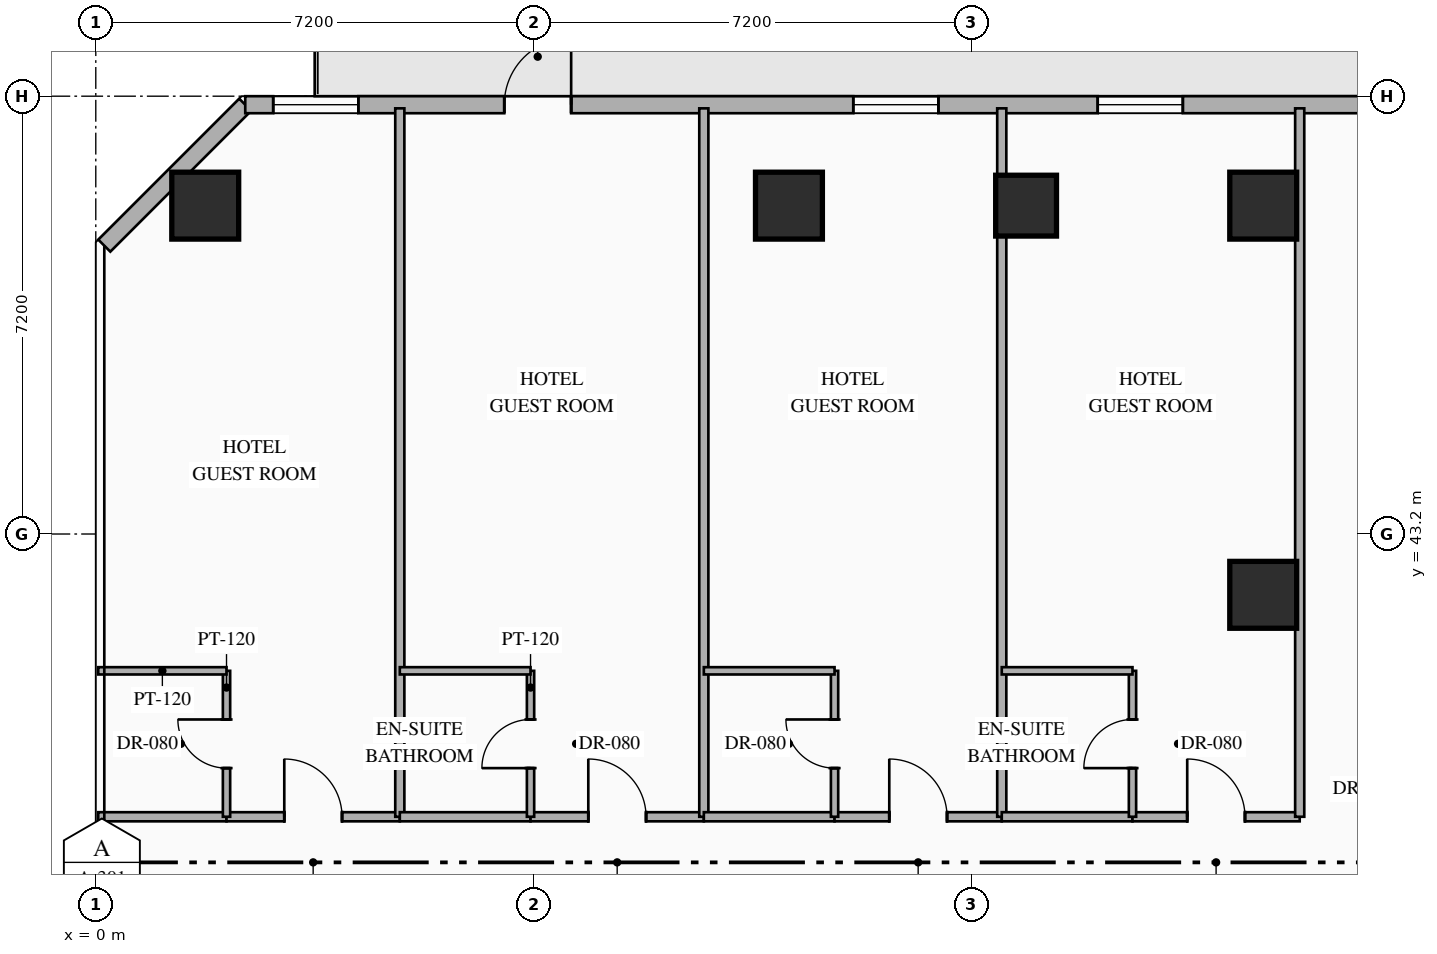
"""IFC4 building model, lengths in metres.
Left out: names, types, materials, properties, quantities, classifications, styles, units other than length and angle.
Written with IfcOpenShell. Run it as: python <this file> out.ifc"""

import sys

from ifc_helpers import new_model, si_unit, direction, frame, frame_2d, origin, origin_2d, place, context, subcontext, project, spatial, rectangle, hollow_rectangle, extrude, element, fill, save


model = new_model("IFC4")
c1 = context("Model", 3, precision=1e-05, world=origin(), true_north=direction((0.0, 1.0)))
c2 = subcontext(c1, "Body", "Model", "MODEL_VIEW")
j1 = project(units=[si_unit("LENGTHUNIT", "METRE"), si_unit("PLANEANGLEUNIT", "RADIAN")], contexts=[c1])
p1 = place(None, origin())
s1 = spatial("IfcSite", under=j1, at=p1, CompositionType="ELEMENT")
p2 = place(p1, origin())
s2 = spatial("IfcBuilding", under=s1, at=p2, CompositionType="ELEMENT")
p3 = place(p2, frame((0.0, 0.0, 43.3)))
s3 = spatial("IfcBuildingStorey", under=s2, at=p3, CompositionType="ELEMENT", Elevation=43.3)
for number, where, z_axis, x_axis in (
    (1, (1.8, 48.6, 0.0), (0.0, 0.0, 1.0), (1.0, 0.0, 0.0)),
    (2, (11.4, 48.6, 0.0), (0.0, 0.0, 1.0), (1.0, 0.0, 0.0)),
    (3, (19.2, 48.6, 0.0), (0.0, 0.0, 1.0), (1.0, 0.0, 0.0)),
    (4, (19.2, 42.2, 0.0), (0.0, 0.0, 1.0), (1.0, 0.0, 0.0)),
):
    element("IfcColumn", number, at=place(p3, frame(where, z_axis=z_axis, x_axis=x_axis)), inside=s3, PredefinedType="COLUMN", context=c2, shape_type="SweptSolid", body=[
        extrude(hollow_rectangle(XDim=1.1, YDim=1.1, WallThickness=0.04, at=origin_2d()), origin(), (0.0, 0.0, 1.0), 3.35),
    ])
p4 = place(p3, frame((15.3, 48.6, 0.0), z_axis=(0.0, 0.0, 1.0), x_axis=(1.0, 0.0, 0.0)))
e5 = element("IfcColumn", 5, at=p4, inside=s3, PredefinedType="COLUMN", context=c2, shape_type="SweptSolid", body=[
    extrude(hollow_rectangle(XDim=1.0, YDim=1.0, WallThickness=0.038, at=origin_2d()), origin(), (0.0, 0.0, 1.0), 3.35),
])
p5 = place(p3, frame((0.14, 47.942, 0.0), z_axis=(0.0, 0.0, 1.0), x_axis=(0.707106781187, 0.707106781187, 0.0)))
e6 = element("IfcWall", 6, at=p5, inside=s3, PredefinedType="STANDARD", context=c2, shape_type="SweptSolid", body=[
    extrude(rectangle(XDim=3.278, YDim=0.28, at=frame_2d((1.639, 0.0))), origin(), (0.0, 0.0, 1.0), 3.13),
])
p6 = place(p3, frame((2.458, 50.26, 0.0), z_axis=(0.0, 0.0, 1.0), x_axis=(1.0, 0.0, 0.0)))
e7 = element("IfcWall", 7, at=p6, inside=s3, PredefinedType="STANDARD", context=c2, shape_type="SweptSolid", body=[
    extrude(rectangle(XDim=40.084, YDim=0.28, at=frame_2d((20.042, 0.0))), origin(), (0.0, 0.0, 1.0), 3.13),
])
p7 = place(p6, frame((4.26, 0.0, 0.0)))
e8 = element("IfcOpeningElement", 8, at=p7, cuts=e7, PredefinedType="OPENING", context=c2, shape_type="SweptSolid", body=[
    extrude(rectangle(XDim=1.1, YDim=2.2, at=frame_2d((0.55, 1.1))), frame((0.0, 0.15, 0.0), z_axis=(0.0, -1.0, 0.0), x_axis=(1.0, 0.0, 0.0)), (0.0, 0.0, 1.0), 0.3),
])
p8 = place(p6, frame((0.46, 0.0, 0.85)))
e9 = element("IfcOpeningElement", 9, at=p8, cuts=e7, PredefinedType="OPENING", context=c2, shape_type="SweptSolid", body=[
    extrude(rectangle(XDim=1.4, YDim=1.8, at=frame_2d((0.7, 0.9))), frame((0.0, 0.15, 0.0), z_axis=(0.0, -1.0, 0.0), x_axis=(1.0, 0.0, 0.0)), (0.0, 0.0, 1.0), 0.3),
])
p9 = place(p6, frame((10.0, 0.0, 0.85)))
e10 = element("IfcOpeningElement", 10, at=p9, cuts=e7, PredefinedType="OPENING", context=c2, shape_type="SweptSolid", body=[
    extrude(rectangle(XDim=1.4, YDim=1.8, at=frame_2d((0.7, 0.9))), frame((0.0, 0.15, 0.0), z_axis=(0.0, -1.0, 0.0), x_axis=(1.0, 0.0, 0.0)), (0.0, 0.0, 1.0), 0.3),
])
p10 = place(p6, frame((14.02, 0.0, 0.85)))
e11 = element("IfcOpeningElement", 11, at=p10, cuts=e7, PredefinedType="OPENING", context=c2, shape_type="SweptSolid", body=[
    extrude(rectangle(XDim=1.4, YDim=1.8, at=frame_2d((0.7, 0.9))), frame((0.0, 0.15, 0.0), z_axis=(0.0, -1.0, 0.0), x_axis=(1.0, 0.0, 0.0)), (0.0, 0.0, 1.0), 0.3),
])
p11 = place(p6, frame((20.789, 0.0, 0.85)))
e12 = element("IfcOpeningElement", 12, at=p11, cuts=e7, PredefinedType="OPENING", context=c2, shape_type="SweptSolid", body=[
    extrude(rectangle(XDim=1.4, YDim=1.8, at=frame_2d((0.7, 0.9))), frame((0.0, 0.15, 0.0), z_axis=(0.0, -1.0, 0.0), x_axis=(1.0, 0.0, 0.0)), (0.0, 0.0, 1.0), 0.3),
])
p12 = place(p6, frame((24.664, 0.0, 0.85)))
e13 = element("IfcOpeningElement", 13, at=p12, cuts=e7, PredefinedType="OPENING", context=c2, shape_type="SweptSolid", body=[
    extrude(rectangle(XDim=1.4, YDim=1.8, at=frame_2d((0.7, 0.9))), frame((0.0, 0.15, 0.0), z_axis=(0.0, -1.0, 0.0), x_axis=(1.0, 0.0, 0.0)), (0.0, 0.0, 1.0), 0.3),
])
p13 = place(p6, frame((26.803, 0.0, 0.85)))
e14 = element("IfcOpeningElement", 14, at=p13, cuts=e7, PredefinedType="OPENING", context=c2, shape_type="SweptSolid", body=[
    extrude(rectangle(XDim=1.4, YDim=1.8, at=frame_2d((0.7, 0.9))), frame((0.0, 0.15, 0.0), z_axis=(0.0, -1.0, 0.0), x_axis=(1.0, 0.0, 0.0)), (0.0, 0.0, 1.0), 0.3),
])
p14 = place(p6, frame((32.703, 0.0, 0.85)))
e15 = element("IfcOpeningElement", 15, at=p14, cuts=e7, PredefinedType="OPENING", context=c2, shape_type="SweptSolid", body=[
    extrude(rectangle(XDim=1.4, YDim=1.8, at=frame_2d((0.7, 0.9))), frame((0.0, 0.15, 0.0), z_axis=(0.0, -1.0, 0.0), x_axis=(1.0, 0.0, 0.0)), (0.0, 0.0, 1.0), 0.3),
])
p15 = place(p6, frame((36.967, 0.0, 0.85)))
e16 = element("IfcOpeningElement", 16, at=p15, cuts=e7, PredefinedType="OPENING", context=c2, shape_type="SweptSolid", body=[
    extrude(rectangle(XDim=1.4, YDim=1.8, at=frame_2d((0.7, 0.9))), frame((0.0, 0.15, 0.0), z_axis=(0.0, -1.0, 0.0), x_axis=(1.0, 0.0, 0.0)), (0.0, 0.0, 1.0), 0.3),
])
p16 = place(p3, frame((0.04, 38.55, 0.0), z_axis=(0.0, 0.0, 1.0), x_axis=(1.0, 0.0, 0.0)))
e17 = element("IfcWall", 17, at=p16, inside=s3, PredefinedType="PARTITIONING", context=c2, shape_type="SweptSolid", body=[
    extrude(rectangle(XDim=2.11, YDim=0.15, at=frame_2d((1.055, 0.0))), origin(), (0.0, 0.0, 1.0), 2.775),
])
p17 = place(p3, frame((2.15, 38.55, 0.0), z_axis=(0.0, 0.0, 1.0), x_axis=(1.0, 0.0, 0.0)))
e18 = element("IfcWall", 18, at=p17, inside=s3, PredefinedType="PARTITIONING", context=c2, shape_type="SweptSolid", body=[
    extrude(rectangle(XDim=2.85, YDim=0.15, at=frame_2d((1.425, 0.0))), origin(), (0.0, 0.0, 1.0), 2.775),
])
p18 = place(p17, frame((0.95, 0.0, 0.0)))
e19 = element("IfcOpeningElement", 19, at=p18, cuts=e18, PredefinedType="OPENING", context=c2, shape_type="SweptSolid", body=[
    extrude(rectangle(XDim=0.95, YDim=2.15, at=frame_2d((0.475, 1.075))), frame((0.0, 0.085, 0.0), z_axis=(0.0, -1.0, 0.0), x_axis=(1.0, 0.0, 0.0)), (0.0, 0.0, 1.0), 0.17),
])
p19 = place(p3, frame((2.15, 38.55, 0.0), z_axis=(0.0, 0.0, 1.0), x_axis=(0.0, 1.0, 0.0)))
e20 = element("IfcWall", 20, at=p19, inside=s3, PredefinedType="PARTITIONING", context=c2, shape_type="SweptSolid", body=[
    extrude(rectangle(XDim=2.4, YDim=0.12, at=frame_2d((1.2, 0.0))), origin(), (0.0, 0.0, 1.0), 3.13),
])
p20 = place(p19, frame((0.8, 0.0, 0.0)))
e21 = element("IfcOpeningElement", 21, at=p20, cuts=e20, PredefinedType="OPENING", context=c2, shape_type="SweptSolid", body=[
    extrude(rectangle(XDim=0.8, YDim=2.06, at=frame_2d((0.4, 1.03))), frame((0.0, 0.07, 0.0), z_axis=(0.0, -1.0, 0.0), x_axis=(1.0, 0.0, 0.0)), (0.0, 0.0, 1.0), 0.14),
])
p21 = place(p3, frame((0.04, 40.95, 0.0), z_axis=(0.0, 0.0, 1.0), x_axis=(1.0, 0.0, 0.0)))
e22 = element("IfcWall", 22, at=p21, inside=s3, PredefinedType="PARTITIONING", context=c2, shape_type="SweptSolid", body=[
    extrude(rectangle(XDim=2.11, YDim=0.12, at=frame_2d((1.055, 0.0))), origin(), (0.0, 0.0, 1.0), 2.775),
])
p22 = place(p3, frame((5.0, 38.55, 0.0), z_axis=(0.0, 0.0, 1.0), x_axis=(0.0, 1.0, 0.0)))
e23 = element("IfcWall", 23, at=p22, inside=s3, PredefinedType="PARTITIONING", context=c2, shape_type="SweptSolid", body=[
    extrude(rectangle(XDim=11.65, YDim=0.15, at=frame_2d((5.825, 0.0))), origin(), (0.0, 0.0, 1.0), 3.13),
])
p23 = place(p3, frame((5.0, 38.55, 0.0), z_axis=(0.0, 0.0, 1.0), x_axis=(1.0, 0.0, 0.0)))
e24 = element("IfcWall", 24, at=p23, inside=s3, PredefinedType="PARTITIONING", context=c2, shape_type="SweptSolid", body=[
    extrude(rectangle(XDim=2.15, YDim=0.15, at=frame_2d((1.075, 0.0))), origin(), (0.0, 0.0, 1.0), 2.775),
])
p24 = place(p3, frame((7.15, 38.55, 0.0), z_axis=(0.0, 0.0, 1.0), x_axis=(1.0, 0.0, 0.0)))
e25 = element("IfcWall", 25, at=p24, inside=s3, PredefinedType="PARTITIONING", context=c2, shape_type="SweptSolid", body=[
    extrude(rectangle(XDim=2.85, YDim=0.15, at=frame_2d((1.425, 0.0))), origin(), (0.0, 0.0, 1.0), 2.775),
])
p25 = place(p24, frame((0.95, 0.0, 0.0)))
e26 = element("IfcOpeningElement", 26, at=p25, cuts=e25, PredefinedType="OPENING", context=c2, shape_type="SweptSolid", body=[
    extrude(rectangle(XDim=0.95, YDim=2.15, at=frame_2d((0.475, 1.075))), frame((0.0, 0.085, 0.0), z_axis=(0.0, -1.0, 0.0), x_axis=(1.0, 0.0, 0.0)), (0.0, 0.0, 1.0), 0.17),
])
p26 = place(p3, frame((7.15, 38.55, 0.0), z_axis=(0.0, 0.0, 1.0), x_axis=(0.0, 1.0, 0.0)))
e27 = element("IfcWall", 27, at=p26, inside=s3, PredefinedType="PARTITIONING", context=c2, shape_type="SweptSolid", body=[
    extrude(rectangle(XDim=2.4, YDim=0.12, at=frame_2d((1.2, 0.0))), origin(), (0.0, 0.0, 1.0), 3.13),
])
p27 = place(p26, frame((0.8, 0.0, 0.0)))
e28 = element("IfcOpeningElement", 28, at=p27, cuts=e27, PredefinedType="OPENING", context=c2, shape_type="SweptSolid", body=[
    extrude(rectangle(XDim=0.8, YDim=2.06, at=frame_2d((0.4, 1.03))), frame((0.0, 0.07, 0.0), z_axis=(0.0, -1.0, 0.0), x_axis=(1.0, 0.0, 0.0)), (0.0, 0.0, 1.0), 0.14),
])
p28 = place(p3, frame((5.0, 40.95, 0.0), z_axis=(0.0, 0.0, 1.0), x_axis=(1.0, 0.0, 0.0)))
e29 = element("IfcWall", 29, at=p28, inside=s3, PredefinedType="PARTITIONING", context=c2, shape_type="SweptSolid", body=[
    extrude(rectangle(XDim=2.15, YDim=0.12, at=frame_2d((1.075, 0.0))), origin(), (0.0, 0.0, 1.0), 2.775),
])
p29 = place(p3, frame((10.0, 38.55, 0.0), z_axis=(0.0, 0.0, 1.0), x_axis=(0.0, 1.0, 0.0)))
e30 = element("IfcWall", 30, at=p29, inside=s3, PredefinedType="PARTITIONING", context=c2, shape_type="SweptSolid", body=[
    extrude(rectangle(XDim=11.65, YDim=0.15, at=frame_2d((5.825, 0.0))), origin(), (0.0, 0.0, 1.0), 3.13),
])
p30 = place(p3, frame((10.0, 38.55, 0.0), z_axis=(0.0, 0.0, 1.0), x_axis=(1.0, 0.0, 0.0)))
e31 = element("IfcWall", 31, at=p30, inside=s3, PredefinedType="PARTITIONING", context=c2, shape_type="SweptSolid", body=[
    extrude(rectangle(XDim=2.15, YDim=0.15, at=frame_2d((1.075, 0.0))), origin(), (0.0, 0.0, 1.0), 2.775),
])
p31 = place(p3, frame((12.15, 38.55, 0.0), z_axis=(0.0, 0.0, 1.0), x_axis=(1.0, 0.0, 0.0)))
e32 = element("IfcWall", 32, at=p31, inside=s3, PredefinedType="PARTITIONING", context=c2, shape_type="SweptSolid", body=[
    extrude(rectangle(XDim=2.75, YDim=0.15, at=frame_2d((1.375, 0.0))), origin(), (0.0, 0.0, 1.0), 2.775),
])
p32 = place(p31, frame((0.9, 0.0, 0.0)))
e33 = element("IfcOpeningElement", 33, at=p32, cuts=e32, PredefinedType="OPENING", context=c2, shape_type="SweptSolid", body=[
    extrude(rectangle(XDim=0.95, YDim=2.15, at=frame_2d((0.475, 1.075))), frame((0.0, 0.085, 0.0), z_axis=(0.0, -1.0, 0.0), x_axis=(1.0, 0.0, 0.0)), (0.0, 0.0, 1.0), 0.17),
])
p33 = place(p3, frame((12.15, 38.55, 0.0), z_axis=(0.0, 0.0, 1.0), x_axis=(0.0, 1.0, 0.0)))
e34 = element("IfcWall", 34, at=p33, inside=s3, PredefinedType="PARTITIONING", context=c2, shape_type="SweptSolid", body=[
    extrude(rectangle(XDim=2.4, YDim=0.12, at=frame_2d((1.2, 0.0))), origin(), (0.0, 0.0, 1.0), 3.13),
])
p34 = place(p33, frame((0.8, 0.0, 0.0)))
e35 = element("IfcOpeningElement", 35, at=p34, cuts=e34, PredefinedType="OPENING", context=c2, shape_type="SweptSolid", body=[
    extrude(rectangle(XDim=0.8, YDim=2.06, at=frame_2d((0.4, 1.03))), frame((0.0, 0.07, 0.0), z_axis=(0.0, -1.0, 0.0), x_axis=(1.0, 0.0, 0.0)), (0.0, 0.0, 1.0), 0.14),
])
p35 = place(p3, frame((10.0, 40.95, 0.0), z_axis=(0.0, 0.0, 1.0), x_axis=(1.0, 0.0, 0.0)))
e36 = element("IfcWall", 36, at=p35, inside=s3, PredefinedType="PARTITIONING", context=c2, shape_type="SweptSolid", body=[
    extrude(rectangle(XDim=2.15, YDim=0.12, at=frame_2d((1.075, 0.0))), origin(), (0.0, 0.0, 1.0), 2.775),
])
p36 = place(p3, frame((14.9, 38.55, 0.0), z_axis=(0.0, 0.0, 1.0), x_axis=(0.0, 1.0, 0.0)))
e37 = element("IfcWall", 37, at=p36, inside=s3, PredefinedType="PARTITIONING", context=c2, shape_type="SweptSolid", body=[
    extrude(rectangle(XDim=11.65, YDim=0.15, at=frame_2d((5.825, 0.0))), origin(), (0.0, 0.0, 1.0), 3.13),
])
p37 = place(p3, frame((14.9, 38.55, 0.0), z_axis=(0.0, 0.0, 1.0), x_axis=(1.0, 0.0, 0.0)))
e38 = element("IfcWall", 38, at=p37, inside=s3, PredefinedType="PARTITIONING", context=c2, shape_type="SweptSolid", body=[
    extrude(rectangle(XDim=2.15, YDim=0.15, at=frame_2d((1.075, 0.0))), origin(), (0.0, 0.0, 1.0), 2.775),
])
p38 = place(p3, frame((17.05, 38.55, 0.0), z_axis=(0.0, 0.0, 1.0), x_axis=(1.0, 0.0, 0.0)))
e39 = element("IfcWall", 39, at=p38, inside=s3, PredefinedType="PARTITIONING", context=c2, shape_type="SweptSolid", body=[
    extrude(rectangle(XDim=2.75, YDim=0.15, at=frame_2d((1.375, 0.0))), origin(), (0.0, 0.0, 1.0), 2.775),
])
p39 = place(p38, frame((0.9, 0.0, 0.0)))
e40 = element("IfcOpeningElement", 40, at=p39, cuts=e39, PredefinedType="OPENING", context=c2, shape_type="SweptSolid", body=[
    extrude(rectangle(XDim=0.95, YDim=2.15, at=frame_2d((0.475, 1.075))), frame((0.0, 0.085, 0.0), z_axis=(0.0, -1.0, 0.0), x_axis=(1.0, 0.0, 0.0)), (0.0, 0.0, 1.0), 0.17),
])
p40 = place(p3, frame((17.05, 38.55, 0.0), z_axis=(0.0, 0.0, 1.0), x_axis=(0.0, 1.0, 0.0)))
e41 = element("IfcWall", 41, at=p40, inside=s3, PredefinedType="PARTITIONING", context=c2, shape_type="SweptSolid", body=[
    extrude(rectangle(XDim=2.4, YDim=0.12, at=frame_2d((1.2, 0.0))), origin(), (0.0, 0.0, 1.0), 3.13),
])
p41 = place(p40, frame((0.8, 0.0, 0.0)))
e42 = element("IfcOpeningElement", 42, at=p41, cuts=e41, PredefinedType="OPENING", context=c2, shape_type="SweptSolid", body=[
    extrude(rectangle(XDim=0.8, YDim=2.06, at=frame_2d((0.4, 1.03))), frame((0.0, 0.07, 0.0), z_axis=(0.0, -1.0, 0.0), x_axis=(1.0, 0.0, 0.0)), (0.0, 0.0, 1.0), 0.14),
])
p42 = place(p3, frame((14.9, 40.95, 0.0), z_axis=(0.0, 0.0, 1.0), x_axis=(1.0, 0.0, 0.0)))
e43 = element("IfcWall", 43, at=p42, inside=s3, PredefinedType="PARTITIONING", context=c2, shape_type="SweptSolid", body=[
    extrude(rectangle(XDim=2.15, YDim=0.12, at=frame_2d((1.075, 0.0))), origin(), (0.0, 0.0, 1.0), 2.775),
])
p43 = place(p3, frame((19.8, 38.55, 0.0), z_axis=(0.0, 0.0, 1.0), x_axis=(0.0, 1.0, 0.0)))
e44 = element("IfcWall", 44, at=p43, inside=s3, PredefinedType="PARTITIONING", context=c2, shape_type="SweptSolid", body=[
    extrude(rectangle(XDim=11.65, YDim=0.15, at=frame_2d((5.825, 0.0))), origin(), (0.0, 0.0, 1.0), 3.13),
])
p44 = place(p7, origin())
e45 = element("IfcDoor", 45, at=p44, inside=s3, OperationType="SINGLE_SWING_RIGHT", PredefinedType="DOOR", context=c2, shape_type="SweptSolid", body=[
    extrude(rectangle(XDim=1.1, YDim=2.2, at=frame_2d((0.55, 1.1))), frame((0.0, 0.025, 0.0), z_axis=(0.0, -1.0, 0.0), x_axis=(1.0, 0.0, 0.0)), (0.0, 0.0, 1.0), 0.05),
])
fill(e8, e45)
p45 = place(p8, origin())
e46 = element("IfcWindow", 46, at=p45, inside=s3, PartitioningType="SINGLE_PANEL", PredefinedType="WINDOW", context=c2, shape_type="SweptSolid", body=[
    extrude(rectangle(XDim=1.4, YDim=1.8, at=frame_2d((0.7, 0.9))), frame((0.0, 0.03, 0.0), z_axis=(0.0, -1.0, 0.0), x_axis=(1.0, 0.0, 0.0)), (0.0, 0.0, 1.0), 0.06),
])
fill(e9, e46)
p46 = place(p9, origin())
e47 = element("IfcWindow", 47, at=p46, inside=s3, PartitioningType="SINGLE_PANEL", PredefinedType="WINDOW", context=c2, shape_type="SweptSolid", body=[
    extrude(rectangle(XDim=1.4, YDim=1.8, at=frame_2d((0.7, 0.9))), frame((0.0, 0.03, 0.0), z_axis=(0.0, -1.0, 0.0), x_axis=(1.0, 0.0, 0.0)), (0.0, 0.0, 1.0), 0.06),
])
fill(e10, e47)
p47 = place(p10, origin())
e48 = element("IfcWindow", 48, at=p47, inside=s3, PartitioningType="SINGLE_PANEL", PredefinedType="WINDOW", context=c2, shape_type="SweptSolid", body=[
    extrude(rectangle(XDim=1.4, YDim=1.8, at=frame_2d((0.7, 0.9))), frame((0.0, 0.03, 0.0), z_axis=(0.0, -1.0, 0.0), x_axis=(1.0, 0.0, 0.0)), (0.0, 0.0, 1.0), 0.06),
])
fill(e11, e48)
p48 = place(p18, origin())
e49 = element("IfcDoor", 49, at=p48, inside=s3, OperationType="SINGLE_SWING_LEFT", PredefinedType="DOOR", context=c2, shape_type="SweptSolid", body=[
    extrude(rectangle(XDim=0.95, YDim=2.15, at=frame_2d((0.475, 1.075))), frame((0.0, 0.025, 0.0), z_axis=(0.0, -1.0, 0.0), x_axis=(1.0, 0.0, 0.0)), (0.0, 0.0, 1.0), 0.05),
])
fill(e19, e49)
p49 = place(p20, origin())
e50 = element("IfcDoor", 50, at=p49, inside=s3, OperationType="SINGLE_SWING_RIGHT", PredefinedType="DOOR", context=c2, shape_type="SweptSolid", body=[
    extrude(rectangle(XDim=0.8, YDim=2.06, at=frame_2d((0.4, 1.03))), frame((0.0, 0.025, 0.0), z_axis=(0.0, -1.0, 0.0), x_axis=(1.0, 0.0, 0.0)), (0.0, 0.0, 1.0), 0.05),
])
fill(e21, e50)
p50 = place(p25, origin())
e51 = element("IfcDoor", 51, at=p50, inside=s3, OperationType="SINGLE_SWING_LEFT", PredefinedType="DOOR", context=c2, shape_type="SweptSolid", body=[
    extrude(rectangle(XDim=0.95, YDim=2.15, at=frame_2d((0.475, 1.075))), frame((0.0, 0.025, 0.0), z_axis=(0.0, -1.0, 0.0), x_axis=(1.0, 0.0, 0.0)), (0.0, 0.0, 1.0), 0.05),
])
fill(e26, e51)
p51 = place(p27, origin())
e52 = element("IfcDoor", 52, at=p51, inside=s3, OperationType="SINGLE_SWING_LEFT", PredefinedType="DOOR", context=c2, shape_type="SweptSolid", body=[
    extrude(rectangle(XDim=0.8, YDim=2.06, at=frame_2d((0.4, 1.03))), frame((0.0, 0.025, 0.0), z_axis=(0.0, -1.0, 0.0), x_axis=(1.0, 0.0, 0.0)), (0.0, 0.0, 1.0), 0.05),
])
fill(e28, e52)
p52 = place(p32, origin())
e53 = element("IfcDoor", 53, at=p52, inside=s3, OperationType="SINGLE_SWING_LEFT", PredefinedType="DOOR", context=c2, shape_type="SweptSolid", body=[
    extrude(rectangle(XDim=0.95, YDim=2.15, at=frame_2d((0.475, 1.075))), frame((0.0, 0.025, 0.0), z_axis=(0.0, -1.0, 0.0), x_axis=(1.0, 0.0, 0.0)), (0.0, 0.0, 1.0), 0.05),
])
fill(e33, e53)
p53 = place(p34, origin())
e54 = element("IfcDoor", 54, at=p53, inside=s3, OperationType="SINGLE_SWING_RIGHT", PredefinedType="DOOR", context=c2, shape_type="SweptSolid", body=[
    extrude(rectangle(XDim=0.8, YDim=2.06, at=frame_2d((0.4, 1.03))), frame((0.0, 0.025, 0.0), z_axis=(0.0, -1.0, 0.0), x_axis=(1.0, 0.0, 0.0)), (0.0, 0.0, 1.0), 0.05),
])
fill(e35, e54)
p54 = place(p39, origin())
e55 = element("IfcDoor", 55, at=p54, inside=s3, OperationType="SINGLE_SWING_LEFT", PredefinedType="DOOR", context=c2, shape_type="SweptSolid", body=[
    extrude(rectangle(XDim=0.95, YDim=2.15, at=frame_2d((0.475, 1.075))), frame((0.0, 0.025, 0.0), z_axis=(0.0, -1.0, 0.0), x_axis=(1.0, 0.0, 0.0)), (0.0, 0.0, 1.0), 0.05),
])
fill(e40, e55)
p55 = place(p41, origin())
e56 = element("IfcDoor", 56, at=p55, inside=s3, OperationType="SINGLE_SWING_LEFT", PredefinedType="DOOR", context=c2, shape_type="SweptSolid", body=[
    extrude(rectangle(XDim=0.8, YDim=2.06, at=frame_2d((0.4, 1.03))), frame((0.0, 0.025, 0.0), z_axis=(0.0, -1.0, 0.0), x_axis=(1.0, 0.0, 0.0)), (0.0, 0.0, 1.0), 0.05),
])
fill(e42, e56)
save(model, sys.argv[1])
